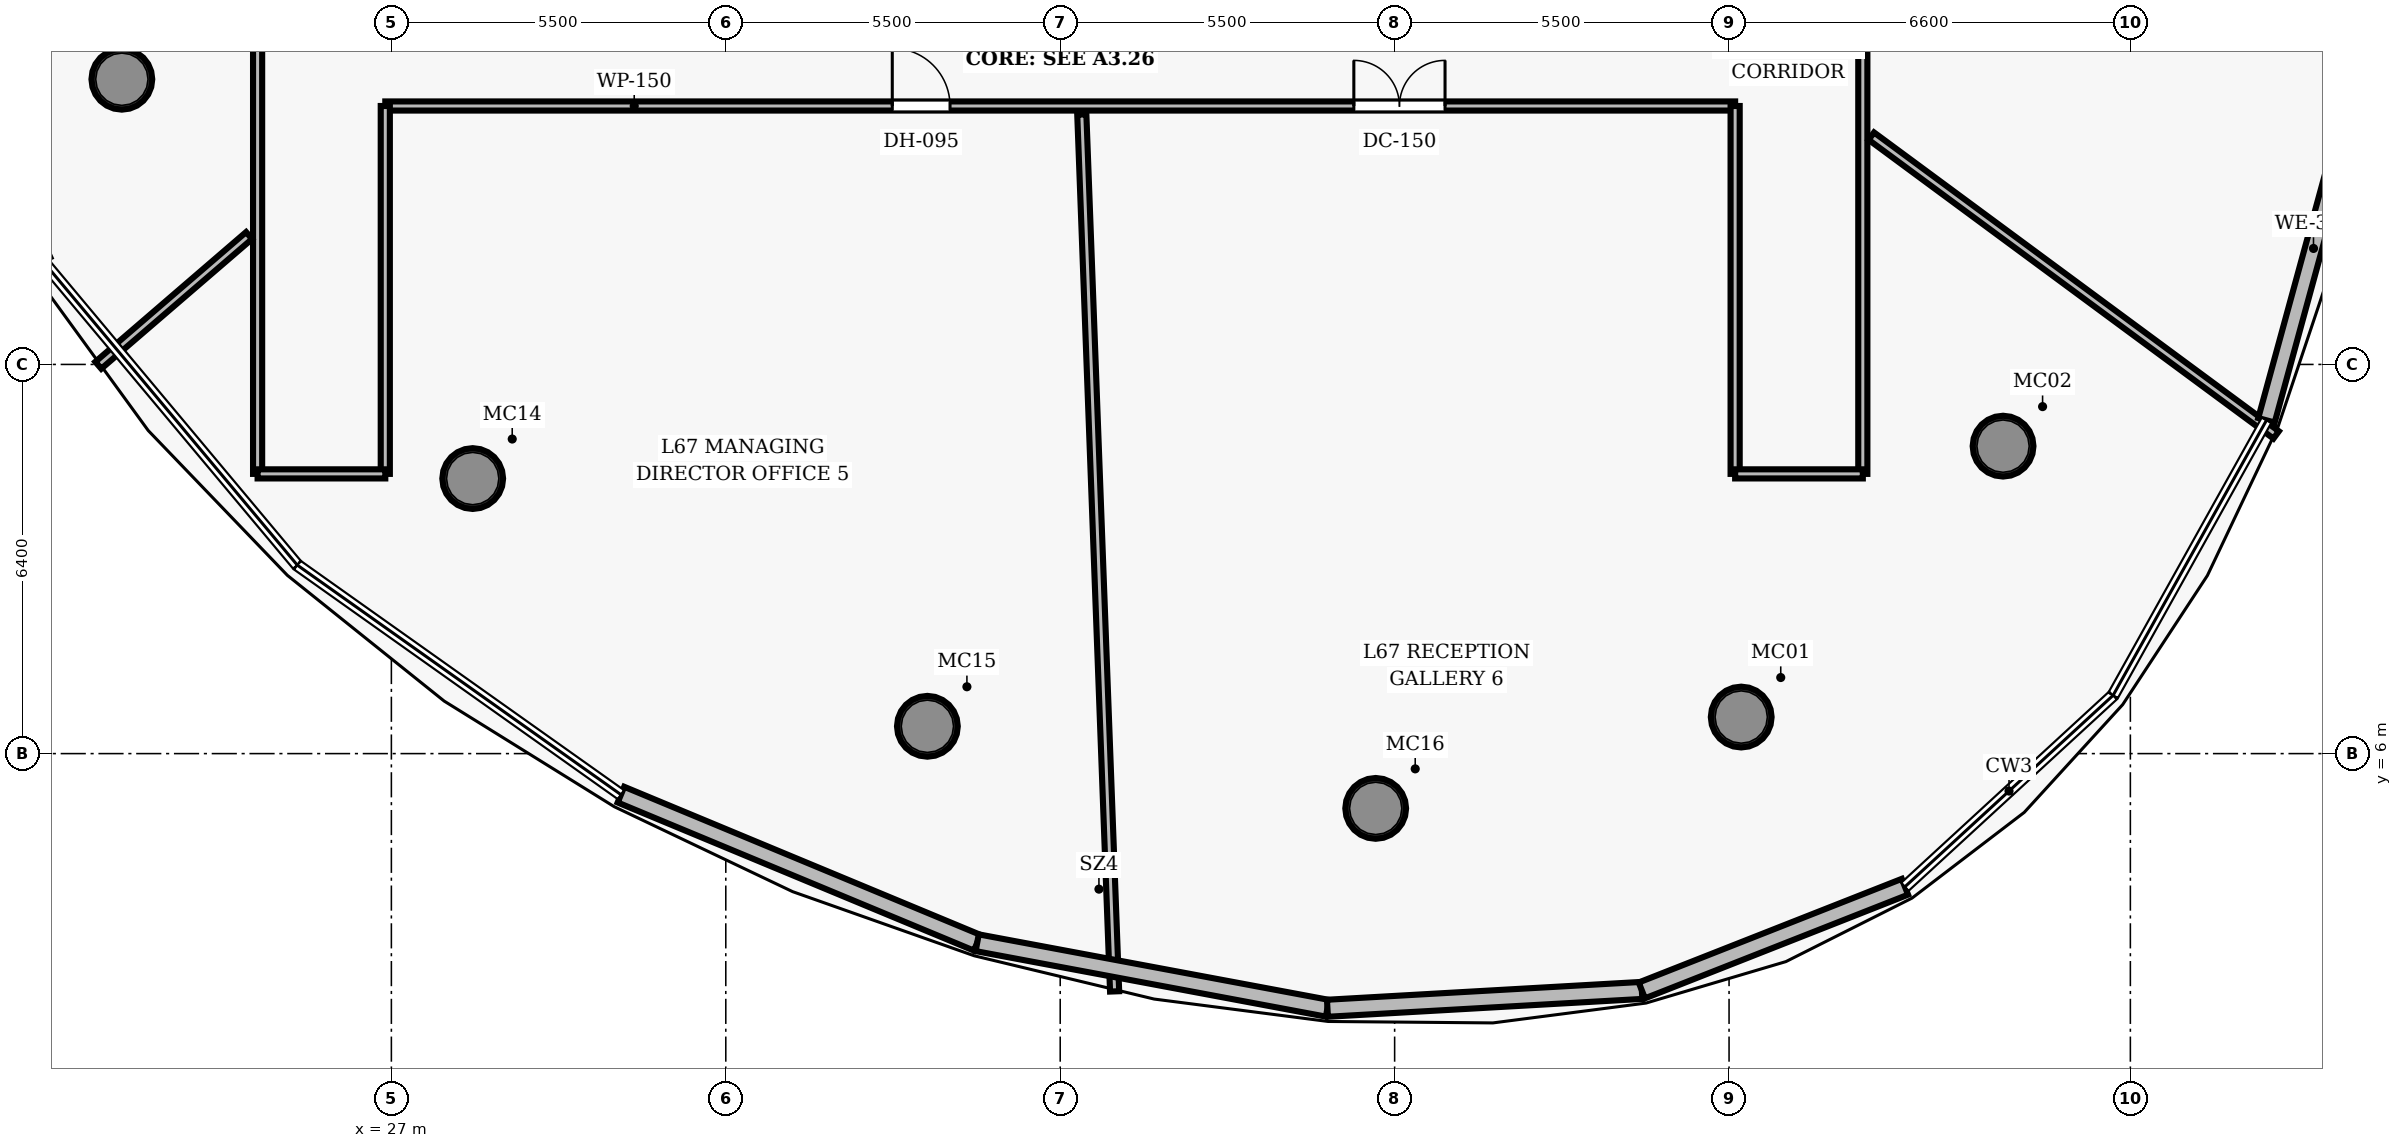
"""IFC4 building model, lengths in metres.
Left out: names, types, materials, properties, quantities, classifications, styles, units other than length and angle.
Written with IfcOpenShell. Run it as: python <this file> out.ifc"""

import sys

from ifc_helpers import new_model, si_unit, direction, frame, frame_2d, origin, origin_2d, place, context, subcontext, project, spatial, rectangle, hollow_circle, extrude, element, fill, save


model = new_model("IFC4")
c1 = context("Model", 3, precision=1e-05, world=origin(), true_north=direction((0.0, 1.0)))
c2 = subcontext(c1, "Body", "Model", "MODEL_VIEW")
j1 = project(units=[si_unit("LENGTHUNIT", "METRE"), si_unit("PLANEANGLEUNIT", "RADIAN")], contexts=[c1])
p1 = place(None, origin())
s1 = spatial("IfcSite", under=j1, at=p1, CompositionType="ELEMENT")
p2 = place(p1, origin())
s2 = spatial("IfcBuilding", under=s1, at=p2, CompositionType="ELEMENT")
p3 = place(p2, frame((0.0, 0.0, 265.15)))
s3 = spatial("IfcBuildingStorey", under=s2, at=p3, CompositionType="ELEMENT", Elevation=265.15)
for number, where, z_axis, x_axis in (
    (1, (49.2, 6.601, 0.0), (0.0, 0.0, 1.0), (1.0, 0.0, 0.0)),
    (2, (53.506, 11.056, 0.0), (0.0, 0.0, 1.0), (1.0, 0.0, 0.0)),
    (3, (22.567, 17.09, 0.0), (0.0, 0.0, 1.0), (1.0, 0.0, 0.0)),
    (4, (28.338, 10.523, 0.0), (0.0, 0.0, 1.0), (1.0, 0.0, 0.0)),
    (5, (35.815, 6.449, 0.0), (0.0, 0.0, 1.0), (1.0, 0.0, 0.0)),
    (6, (43.188, 5.099, 0.0), (0.0, 0.0, 1.0), (1.0, 0.0, 0.0)),
):
    element("IfcColumn", number, at=place(p3, frame(where, z_axis=z_axis, x_axis=x_axis)), inside=s3, PredefinedType="COLUMN", context=c2, shape_type="SweptSolid", body=[
        extrude(hollow_circle(Radius=0.5, WallThickness=0.045, at=origin_2d()), origin(), (0.0, 0.0, 1.0), 3.85),
    ])
p4 = place(p3, frame((26.9, 16.65, 0.0), z_axis=(0.0, 0.0, 1.0), x_axis=(1.0, 0.0, 0.0)))
e7 = element("IfcWall", 7, at=p4, inside=s3, PredefinedType="PARTITIONING", context=c2, shape_type="SweptSolid", body=[
    extrude(rectangle(XDim=22.2, YDim=0.15, at=frame_2d((11.1, 0.0))), origin(), (0.0, 0.0, 1.0), 3.04),
])
p5 = place(p4, frame((8.338, 0.0, 0.0)))
e8 = element("IfcOpeningElement", 8, at=p5, cuts=e7, PredefinedType="OPENING", context=c2, shape_type="SweptSolid", body=[
    extrude(rectangle(XDim=0.95, YDim=2.15, at=frame_2d((0.475, 1.075))), frame((0.0, 0.085, 0.0), z_axis=(0.0, -1.0, 0.0), x_axis=(1.0, 0.0, 0.0)), (0.0, 0.0, 1.0), 0.17),
])
p6 = place(p4, frame((15.929, 0.0, 0.0)))
e9 = element("IfcOpeningElement", 9, at=p6, cuts=e7, PredefinedType="OPENING", context=c2, shape_type="SweptSolid", body=[
    extrude(rectangle(XDim=1.5, YDim=2.2, at=frame_2d((0.75, 1.1))), frame((0.0, 0.085, 0.0), z_axis=(0.0, -1.0, 0.0), x_axis=(1.0, 0.0, 0.0)), (0.0, 0.0, 1.0), 0.17),
])
p7 = place(p3, frame((24.8, 10.6, 0.0), z_axis=(0.0, 0.0, 1.0), x_axis=(0.0, 1.0, 0.0)))
e10 = element("IfcWall", 10, at=p7, inside=s3, PredefinedType="PARTITIONING", context=c2, shape_type="SweptSolid", body=[
    extrude(rectangle(XDim=30.8, YDim=0.15, at=frame_2d((15.4, 0.0))), origin(), (0.0, 0.0, 1.0), 3.04),
])
p8 = place(p7, frame((12.632, 0.0, 0.0)))
e11 = element("IfcOpeningElement", 11, at=p8, cuts=e10, PredefinedType="OPENING", context=c2, shape_type="SweptSolid", body=[
    extrude(rectangle(XDim=0.95, YDim=2.15, at=frame_2d((0.475, 1.075))), frame((0.0, 0.085, 0.0), z_axis=(0.0, -1.0, 0.0), x_axis=(1.0, 0.0, 0.0)), (0.0, 0.0, 1.0), 0.17),
])
p9 = place(p3, frame((26.9, 10.6, 0.0), z_axis=(0.0, 0.0, 1.0), x_axis=(0.0, 1.0, 0.0)))
e12 = element("IfcWall", 12, at=p9, inside=s3, PredefinedType="PARTITIONING", context=c2, shape_type="SweptSolid", body=[
    extrude(rectangle(XDim=6.05, YDim=0.15, at=frame_2d((3.025, 0.0))), origin(), (0.0, 0.0, 1.0), 3.04),
])
p10 = place(p3, frame((24.8, 10.6, 0.0), z_axis=(0.0, 0.0, 1.0), x_axis=(1.0, 0.0, 0.0)))
e13 = element("IfcWall", 13, at=p10, inside=s3, PredefinedType="PARTITIONING", context=c2, shape_type="SweptSolid", body=[
    extrude(rectangle(XDim=2.1, YDim=0.15, at=frame_2d((1.05, 0.0))), origin(), (0.0, 0.0, 1.0), 3.04),
])
p11 = place(p3, frame((51.2, 10.6, 0.0), z_axis=(0.0, 0.0, 1.0), x_axis=(0.0, 1.0, 0.0)))
e14 = element("IfcWall", 14, at=p11, inside=s3, PredefinedType="PARTITIONING", context=c2, shape_type="SweptSolid", body=[
    extrude(rectangle(XDim=30.089, YDim=0.15, at=frame_2d((15.044, 0.0))), origin(), (0.0, 0.0, 1.0), 3.04),
])
p12 = place(p11, frame((26.485, 0.0, 0.0)))
e15 = element("IfcOpeningElement", 15, at=p12, cuts=e14, PredefinedType="OPENING", context=c2, shape_type="SweptSolid", body=[
    extrude(rectangle(XDim=1.5, YDim=2.2, at=frame_2d((0.75, 1.1))), frame((0.0, 0.085, 0.0), z_axis=(0.0, -1.0, 0.0), x_axis=(1.0, 0.0, 0.0)), (0.0, 0.0, 1.0), 0.17),
])
p13 = place(p11, frame((15.289, 0.0, 0.0)))
e16 = element("IfcOpeningElement", 16, at=p13, cuts=e14, PredefinedType="OPENING", context=c2, shape_type="SweptSolid", body=[
    extrude(rectangle(XDim=0.95, YDim=2.15, at=frame_2d((0.475, 1.075))), frame((0.0, 0.085, 0.0), z_axis=(0.0, -1.0, 0.0), x_axis=(1.0, 0.0, 0.0)), (0.0, 0.0, 1.0), 0.17),
])
p14 = place(p3, frame((49.1, 10.6, 0.0), z_axis=(0.0, 0.0, 1.0), x_axis=(0.0, 1.0, 0.0)))
e17 = element("IfcWall", 17, at=p14, inside=s3, PredefinedType="PARTITIONING", context=c2, shape_type="SweptSolid", body=[
    extrude(rectangle(XDim=6.05, YDim=0.15, at=frame_2d((3.025, 0.0))), origin(), (0.0, 0.0, 1.0), 3.04),
])
p15 = place(p3, frame((49.1, 10.6, 0.0), z_axis=(0.0, 0.0, 1.0), x_axis=(1.0, 0.0, 0.0)))
e18 = element("IfcWall", 18, at=p15, inside=s3, PredefinedType="PARTITIONING", context=c2, shape_type="SweptSolid", body=[
    extrude(rectangle(XDim=2.1, YDim=0.15, at=frame_2d((1.05, 0.0))), origin(), (0.0, 0.0, 1.0), 3.04),
])
p16 = place(p3, frame((24.66, 14.52, 0.0), z_axis=(0.0, 0.0, 1.0), x_axis=(-0.757932783807, -0.652332656879, 0.0)))
e19 = element("IfcWall", 19, at=p16, inside=s3, PredefinedType="PARTITIONING", context=c2, shape_type="SweptSolid", body=[
    extrude(rectangle(XDim=3.271, YDim=0.15, at=frame_2d((1.636, 0.0))), origin(), (0.0, 0.0, 1.0), 3.04),
])
p17 = place(p3, frame((38.355, 16.51, 0.0), z_axis=(0.0, 0.0, 1.0), x_axis=(0.03740587204, -0.999300155477, 0.0)))
e20 = element("IfcWall", 20, at=p17, inside=s3, PredefinedType="PARTITIONING", context=c2, shape_type="SweptSolid", body=[
    extrude(rectangle(XDim=14.431, YDim=0.15, at=frame_2d((7.215, 0.0))), origin(), (0.0, 0.0, 1.0), 3.04),
])
p18 = place(p3, frame((51.34, 16.155, 0.0), z_axis=(0.0, 0.0, 1.0), x_axis=(0.804600259719, -0.593816825343, 0.0)))
e21 = element("IfcWall", 21, at=p18, inside=s3, PredefinedType="PARTITIONING", context=c2, shape_type="SweptSolid", body=[
    extrude(rectangle(XDim=8.275, YDim=0.15, at=frame_2d((4.137, 0.0))), origin(), (0.0, 0.0, 1.0), 3.04),
])
p19 = place(p3, frame((59.385, 17.134, 0.0), z_axis=(0.0, 0.0, 1.0), x_axis=(-0.264002098422, -0.964522105516, 0.0)))
e22 = element("IfcWall", 22, at=p19, inside=s3, PredefinedType="SOLIDWALL", context=c2, shape_type="SweptSolid", body=[
    extrude(rectangle(XDim=5.86, YDim=0.28, at=frame_2d((2.93, 0.0))), origin(), (0.0, 0.0, 1.0), 3.625),
])
p20 = place(p3, frame((36.635, 2.89, 0.0), z_axis=(0.0, 0.0, 1.0), x_axis=(-0.923404423641, 0.38382843876, 0.0)))
e23 = element("IfcWall", 23, at=p20, inside=s3, PredefinedType="SOLIDWALL", context=c2, shape_type="SweptSolid", body=[
    extrude(rectangle(XDim=6.345, YDim=0.28, at=frame_2d((3.173, 0.0))), origin(), (0.0, 0.0, 1.0), 3.625),
])
p21 = place(p3, frame((42.395, 1.812, 0.0), z_axis=(0.0, 0.0, 1.0), x_axis=(-0.982954154171, 0.183850838449, 0.0)))
e24 = element("IfcWall", 24, at=p21, inside=s3, PredefinedType="SOLIDWALL", context=c2, shape_type="SweptSolid", body=[
    extrude(rectangle(XDim=5.86, YDim=0.28, at=frame_2d((2.93, 0.0))), origin(), (0.0, 0.0, 1.0), 3.625),
])
p22 = place(p3, frame((47.566, 2.105, 0.0), z_axis=(0.0, 0.0, 1.0), x_axis=(-0.998396170021, -0.056613493871, 0.0)))
e25 = element("IfcWall", 25, at=p22, inside=s3, PredefinedType="SOLIDWALL", context=c2, shape_type="SweptSolid", body=[
    extrude(rectangle(XDim=5.179, YDim=0.28, at=frame_2d((2.59, 0.0))), origin(), (0.0, 0.0, 1.0), 3.625),
])
p23 = place(p3, frame((51.893, 3.81, 0.0), z_axis=(0.0, 0.0, 1.0), x_axis=(-0.930379636763, -0.366597506123, 0.0)))
e26 = element("IfcWall", 26, at=p23, inside=s3, PredefinedType="SOLIDWALL", context=c2, shape_type="SweptSolid", body=[
    extrude(rectangle(XDim=4.65, YDim=0.28, at=frame_2d((2.325, 0.0))), origin(), (0.0, 0.0, 1.0), 3.625),
])
p24 = place(p5, origin())
e27 = element("IfcDoor", 27, at=p24, inside=s3, OperationType="SINGLE_SWING_LEFT", PredefinedType="DOOR", context=c2, shape_type="SweptSolid", body=[
    extrude(rectangle(XDim=0.95, YDim=2.15, at=frame_2d((0.475, 1.075))), frame((0.0, 0.025, 0.0), z_axis=(0.0, -1.0, 0.0), x_axis=(1.0, 0.0, 0.0)), (0.0, 0.0, 1.0), 0.05),
])
fill(e8, e27)
p25 = place(p6, origin())
e28 = element("IfcDoor", 28, at=p25, inside=s3, OperationType="DOUBLE_DOOR_SINGLE_SWING", PredefinedType="DOOR", context=c2, shape_type="SweptSolid", body=[
    extrude(rectangle(XDim=1.5, YDim=2.2, at=frame_2d((0.75, 1.1))), frame((0.0, 0.025, 0.0), z_axis=(0.0, -1.0, 0.0), x_axis=(1.0, 0.0, 0.0)), (0.0, 0.0, 1.0), 0.05),
])
fill(e9, e28)
save(model, sys.argv[1])
